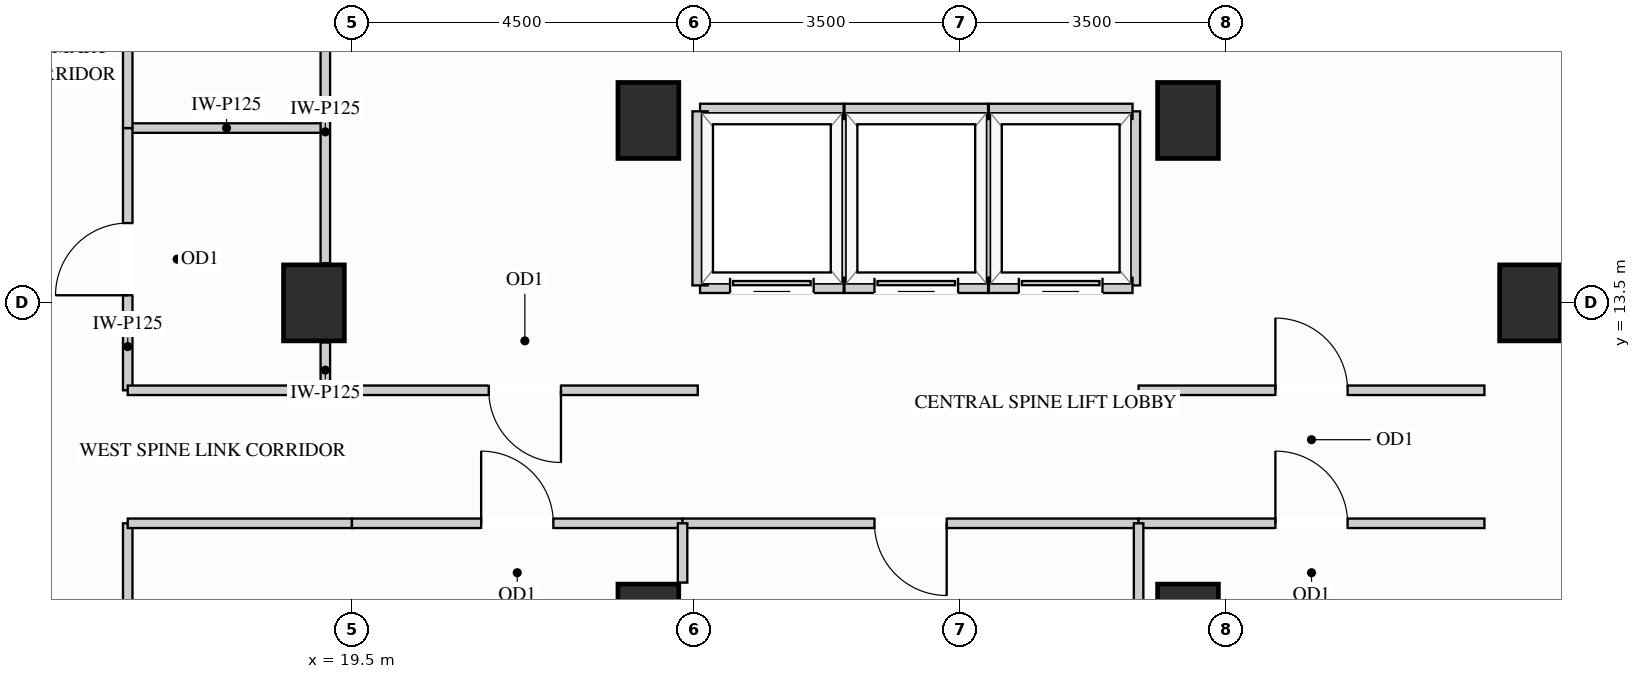
"""IFC4 building model, lengths in metres.
Left out: names, types, materials, properties, quantities, classifications, styles, units other than length and angle.
Written with IfcOpenShell. Run it as: python <this file> out.ifc"""

import sys

from ifc_helpers import new_model, si_unit, direction, frame, frame_2d, origin, origin_2d, place, context, subcontext, project, spatial, rectangle, extrude, source, transform, mapped, element, fill, save


model = new_model("IFC4")
c1 = context("Model", 3, precision=1e-05, world=origin(), true_north=direction((0.0, 1.0)))
c2 = subcontext(c1, "Body", "Model", "MODEL_VIEW")
j1 = project(units=[si_unit("LENGTHUNIT", "METRE"), si_unit("PLANEANGLEUNIT", "RADIAN")], contexts=[c1])
p1 = place(None, origin())
s1 = spatial("IfcSite", under=j1, at=p1, CompositionType="ELEMENT")
p2 = place(p1, origin())
s2 = spatial("IfcBuilding", under=s1, at=p2, CompositionType="ELEMENT")
p3 = place(p2, frame((0.0, 0.0, 186.3)))
s3 = spatial("IfcBuildingStorey", under=s2, at=p3, CompositionType="ELEMENT", Elevation=186.3)
m1 = source(origin(), c2, "Body", "SweptSolid", [
    extrude(rectangle(XDim=0.8, YDim=1.0, at=origin_2d()), origin(), (0.0, 0.0, 1.0), 3.4),
])
for number, where, z_axis, x_axis in (
    (1, (19.0, 13.5, 0.0), (0.0, 0.0, 1.0), (1.0, 0.0, 0.0)),
    (2, (35.0, 13.5, 0.0), (0.0, 0.0, 1.0), (1.0, 0.0, 0.0)),
    (3, (23.4, 15.9, 0.0), (0.0, 0.0, 1.0), (1.0, 0.0, 0.0)),
    (4, (23.4, 9.3, 0.0), (0.0, 0.0, 1.0), (1.0, 0.0, 0.0)),
    (5, (30.5, 15.9, 0.0), (0.0, 0.0, 1.0), (1.0, 0.0, 0.0)),
    (6, (30.5, 9.3, 0.0), (0.0, 0.0, 1.0), (1.0, 0.0, 0.0)),
):
    element("IfcColumn", number, at=place(p3, frame(where, z_axis=z_axis, x_axis=x_axis)), inside=s3, PredefinedType="COLUMN", context=c2, shape_type="MappedRepresentation", body=[
        mapped(m1, transform((0.0, 0.0, 0.0), x_axis=(1.0, 0.0, 0.0), y_axis=(0.0, 1.0, 0.0), z_axis=(0.0, 0.0, 1.0))),
    ])
m2 = source(origin(), c2, "Body", "SweptSolid", [
    extrude(rectangle(XDim=2.6, YDim=0.125, at=frame_2d((1.3, 0.0))), origin(), (0.0, 0.0, 1.0), 3.385),
])
p4 = place(p3, frame((16.55, 15.8, 0.0), z_axis=(0.0, 0.0, 1.0), x_axis=(1.0, 0.0, 0.0)))
e7 = element("IfcWall", 7, at=p4, inside=s3, PredefinedType="PARTITIONING", context=c2, shape_type="MappedRepresentation", body=[
    mapped(m2, transform((0.0, 0.0, 0.0), x_axis=(1.0, 0.0, 0.0), y_axis=(0.0, 1.0, 0.0), z_axis=(0.0, 0.0, 1.0))),
])
m3 = source(origin(), c2, "Body", "SweptSolid", [
    extrude(rectangle(XDim=0.63, YDim=0.125, at=frame_2d((0.315, 0.0))), origin(), (0.0, 0.0, 1.0), 2.773),
])
p5 = place(p3, frame((19.15, 12.35, 0.0), z_axis=(0.0, 0.0, 1.0), x_axis=(0.0, 1.0, 0.0)))
e8 = element("IfcWall", 8, at=p5, inside=s3, PredefinedType="PARTITIONING", context=c2, shape_type="MappedRepresentation", body=[
    mapped(m3, transform((0.0, 0.0, 0.0), x_axis=(1.0, 0.0, 0.0), y_axis=(0.0, 1.0, 0.0), z_axis=(0.0, 0.0, 1.0))),
])
m4 = source(origin(), c2, "Body", "SweptSolid", [
    extrude(rectangle(XDim=3.46, YDim=0.125, at=frame_2d((1.73, 0.0))), origin(), (0.0, 0.0, 1.0), 2.773),
])
p6 = place(p3, frame((19.15, 14.02, 0.0), z_axis=(0.0, 0.0, 1.0), x_axis=(0.0, 1.0, 0.0)))
e9 = element("IfcWall", 9, at=p6, inside=s3, PredefinedType="PARTITIONING", context=c2, shape_type="MappedRepresentation", body=[
    mapped(m4, transform((0.0, 0.0, 0.0), x_axis=(1.0, 0.0, 0.0), y_axis=(0.0, 1.0, 0.0), z_axis=(0.0, 0.0, 1.0))),
])
p7 = place(p3, frame((16.55, 12.35, 0.0), z_axis=(0.0, 0.0, 1.0), x_axis=(0.0, 1.0, 0.0)))
e10 = element("IfcWall", 10, at=p7, inside=s3, PredefinedType="PARTITIONING", context=c2, shape_type="SweptSolid", body=[
    extrude(rectangle(XDim=3.45, YDim=0.125, at=frame_2d((1.725, 0.0))), origin(), (0.0, 0.0, 1.0), 3.385),
])
p8 = place(p7, frame((1.25, 0.0, 0.0)))
e11 = element("IfcOpeningElement", 11, at=p8, cuts=e10, PredefinedType="OPENING", context=c2, shape_type="SweptSolid", body=[
    extrude(rectangle(XDim=0.95, YDim=2.15, at=frame_2d((0.475, 1.075))), frame((0.0, 0.073, 0.0), z_axis=(0.0, -1.0, 0.0), x_axis=(1.0, 0.0, 0.0)), (0.0, 0.0, 1.0), 0.145),
])
p9 = place(p3, frame((16.55, 15.8, 0.0), z_axis=(0.0, 0.0, 1.0), x_axis=(0.0, 1.0, 0.0)))
e12 = element("IfcWall", 12, at=p9, inside=s3, PredefinedType="PARTITIONING", context=c2, shape_type="SweptSolid", body=[
    extrude(rectangle(XDim=7.55, YDim=0.125, at=frame_2d((3.775, 0.0))), origin(), (0.0, 0.0, 1.0), 3.385),
])
p10 = place(p9, frame((3.3, 0.0, 0.0)))
e13 = element("IfcOpeningElement", 13, at=p10, cuts=e12, PredefinedType="OPENING", context=c2, shape_type="SweptSolid", body=[
    extrude(rectangle(XDim=0.95, YDim=2.15, at=frame_2d((0.475, 1.075))), frame((0.0, 0.073, 0.0), z_axis=(0.0, -1.0, 0.0), x_axis=(1.0, 0.0, 0.0)), (0.0, 0.0, 1.0), 0.145),
])
p11 = place(p3, frame((16.55, 5.35, 0.0), z_axis=(0.0, 0.0, 1.0), x_axis=(0.0, 1.0, 0.0)))
e14 = element("IfcWall", 14, at=p11, inside=s3, PredefinedType="PARTITIONING", context=c2, shape_type="SweptSolid", body=[
    extrude(rectangle(XDim=5.25, YDim=0.125, at=frame_2d((2.625, 0.0))), origin(), (0.0, 0.0, 1.0), 3.385),
])
p12 = place(p11, frame((2.15, 0.0, 0.0)))
e15 = element("IfcOpeningElement", 15, at=p12, cuts=e14, PredefinedType="OPENING", context=c2, shape_type="SweptSolid", body=[
    extrude(rectangle(XDim=0.95, YDim=2.15, at=frame_2d((0.475, 1.075))), frame((0.0, 0.073, 0.0), z_axis=(0.0, -1.0, 0.0), x_axis=(1.0, 0.0, 0.0)), (0.0, 0.0, 1.0), 0.145),
])
p13 = place(p3, frame((29.85, 12.35, 0.0), z_axis=(0.0, 0.0, 1.0), x_axis=(1.0, 0.0, 0.0)))
e16 = element("IfcWall", 16, at=p13, inside=s3, PredefinedType="PARTITIONING", context=c2, shape_type="SweptSolid", body=[
    extrude(rectangle(XDim=4.55, YDim=0.125, at=frame_2d((2.275, 0.0))), origin(), (0.0, 0.0, 1.0), 3.385),
])
p14 = place(p13, frame((1.8, 0.0, 0.0)))
e17 = element("IfcOpeningElement", 17, at=p14, cuts=e16, PredefinedType="OPENING", context=c2, shape_type="SweptSolid", body=[
    extrude(rectangle(XDim=0.95, YDim=2.15, at=frame_2d((0.475, 1.075))), frame((0.0, 0.073, 0.0), z_axis=(0.0, -1.0, 0.0), x_axis=(1.0, 0.0, 0.0)), (0.0, 0.0, 1.0), 0.145),
])
m5 = source(origin(), c2, "Body", "SweptSolid", [
    extrude(rectangle(XDim=2.95, YDim=0.125, at=frame_2d((1.475, 0.0))), origin(), (0.0, 0.0, 1.0), 3.385),
])
p15 = place(p3, frame((16.55, 12.35, 0.0), z_axis=(0.0, 0.0, 1.0), x_axis=(1.0, 0.0, 0.0)))
e18 = element("IfcWall", 18, at=p15, inside=s3, PredefinedType="PARTITIONING", context=c2, shape_type="MappedRepresentation", body=[
    mapped(m5, transform((0.0, 0.0, 0.0), x_axis=(1.0, 0.0, 0.0), y_axis=(0.0, 1.0, 0.0), z_axis=(0.0, 0.0, 1.0))),
])
p16 = place(p3, frame((19.5, 12.35, 0.0), z_axis=(0.0, 0.0, 1.0), x_axis=(1.0, 0.0, 0.0)))
e19 = element("IfcWall", 19, at=p16, inside=s3, PredefinedType="PARTITIONING", context=c2, shape_type="SweptSolid", body=[
    extrude(rectangle(XDim=4.55, YDim=0.125, at=frame_2d((2.275, 0.0))), origin(), (0.0, 0.0, 1.0), 3.385),
])
p17 = place(p16, frame((1.8, 0.0, 0.0)))
e20 = element("IfcOpeningElement", 20, at=p17, cuts=e19, PredefinedType="OPENING", context=c2, shape_type="SweptSolid", body=[
    extrude(rectangle(XDim=0.95, YDim=2.15, at=frame_2d((0.475, 1.075))), frame((0.0, 0.073, 0.0), z_axis=(0.0, -1.0, 0.0), x_axis=(1.0, 0.0, 0.0)), (0.0, 0.0, 1.0), 0.145),
])
p18 = place(p3, frame((16.55, 10.6, 0.0), z_axis=(0.0, 0.0, 1.0), x_axis=(1.0, 0.0, 0.0)))
e21 = element("IfcWall", 21, at=p18, inside=s3, PredefinedType="PARTITIONING", context=c2, shape_type="MappedRepresentation", body=[
    mapped(m5, transform((0.0, 0.0, 0.0), x_axis=(1.0, 0.0, 0.0), y_axis=(0.0, 1.0, 0.0), z_axis=(0.0, 0.0, 1.0))),
])
p19 = place(p3, frame((19.5, 10.6, 0.0), z_axis=(0.0, 0.0, 1.0), x_axis=(1.0, 0.0, 0.0)))
e22 = element("IfcWall", 22, at=p19, inside=s3, PredefinedType="PARTITIONING", context=c2, shape_type="SweptSolid", body=[
    extrude(rectangle(XDim=4.35, YDim=0.125, at=frame_2d((2.175, 0.0))), origin(), (0.0, 0.0, 1.0), 3.385),
])
p20 = place(p19, frame((1.7, 0.0, 0.0)))
e23 = element("IfcOpeningElement", 23, at=p20, cuts=e22, PredefinedType="OPENING", context=c2, shape_type="SweptSolid", body=[
    extrude(rectangle(XDim=0.95, YDim=2.15, at=frame_2d((0.475, 1.075))), frame((0.0, 0.073, 0.0), z_axis=(0.0, -1.0, 0.0), x_axis=(1.0, 0.0, 0.0)), (0.0, 0.0, 1.0), 0.145),
])
p21 = place(p3, frame((23.85, 10.6, 0.0), z_axis=(0.0, 0.0, 1.0), x_axis=(1.0, 0.0, 0.0)))
e24 = element("IfcWall", 24, at=p21, inside=s3, PredefinedType="PARTITIONING", context=c2, shape_type="SweptSolid", body=[
    extrude(rectangle(XDim=6.0, YDim=0.125, at=frame_2d((3.0, 0.0))), origin(), (0.0, 0.0, 1.0), 3.385),
])
p22 = place(p21, frame((2.525, 0.0, 0.0)))
e25 = element("IfcOpeningElement", 25, at=p22, cuts=e24, PredefinedType="OPENING", context=c2, shape_type="SweptSolid", body=[
    extrude(rectangle(XDim=0.95, YDim=2.15, at=frame_2d((0.475, 1.075))), frame((0.0, 0.073, 0.0), z_axis=(0.0, -1.0, 0.0), x_axis=(1.0, 0.0, 0.0)), (0.0, 0.0, 1.0), 0.145),
])
p23 = place(p3, frame((29.85, 10.6, 0.0), z_axis=(0.0, 0.0, 1.0), x_axis=(1.0, 0.0, 0.0)))
e26 = element("IfcWall", 26, at=p23, inside=s3, PredefinedType="PARTITIONING", context=c2, shape_type="SweptSolid", body=[
    extrude(rectangle(XDim=4.55, YDim=0.125, at=frame_2d((2.275, 0.0))), origin(), (0.0, 0.0, 1.0), 3.385),
])
p24 = place(p23, frame((1.8, 0.0, 0.0)))
e27 = element("IfcOpeningElement", 27, at=p24, cuts=e26, PredefinedType="OPENING", context=c2, shape_type="SweptSolid", body=[
    extrude(rectangle(XDim=0.95, YDim=2.15, at=frame_2d((0.475, 1.075))), frame((0.0, 0.073, 0.0), z_axis=(0.0, -1.0, 0.0), x_axis=(1.0, 0.0, 0.0)), (0.0, 0.0, 1.0), 0.145),
])
m6 = source(origin(), c2, "Body", "SweptSolid", [
    extrude(rectangle(XDim=0.78, YDim=0.125, at=frame_2d((0.39, 0.0))), origin(), (0.0, 0.0, 1.0), 3.385),
])
p25 = place(p3, frame((23.85, 9.82, 0.0), z_axis=(0.0, 0.0, 1.0), x_axis=(0.0, 1.0, 0.0)))
e28 = element("IfcWall", 28, at=p25, inside=s3, PredefinedType="PARTITIONING", context=c2, shape_type="MappedRepresentation", body=[
    mapped(m6, transform((0.0, 0.0, 0.0), x_axis=(1.0, 0.0, 0.0), y_axis=(0.0, 1.0, 0.0), z_axis=(0.0, 0.0, 1.0))),
])
m7 = source(origin(), c2, "Body", "SweptSolid", [
    extrude(rectangle(XDim=1.748, YDim=0.125, at=frame_2d((0.874, 0.0))), origin(), (0.0, 0.0, 1.0), 3.385),
])
p26 = place(p3, frame((29.85, 8.852, 0.0), z_axis=(0.0, 0.0, 1.0), x_axis=(0.0, 1.0, 0.0)))
e29 = element("IfcWall", 29, at=p26, inside=s3, PredefinedType="PARTITIONING", context=c2, shape_type="MappedRepresentation", body=[
    mapped(m7, transform((0.0, 0.0, 0.0), x_axis=(1.0, 0.0, 0.0), y_axis=(0.0, 1.0, 0.0), z_axis=(0.0, 0.0, 1.0))),
])
m8 = source(origin(), c2, "Body", "SweptSolid", [
    extrude(rectangle(XDim=2.29, YDim=0.2, at=frame_2d((1.145, 0.0))), origin(), (0.0, 0.0, 1.0), 3.385),
])
p27 = place(p3, frame((25.97, 13.73, 0.0), z_axis=(0.0, 0.0, 1.0), x_axis=(0.0, 1.0, 0.0)))
e30 = element("IfcWall", 30, at=p27, inside=s3, PredefinedType="PARTITIONING", context=c2, shape_type="MappedRepresentation", body=[
    mapped(m8, transform((0.0, 0.0, 0.0), x_axis=(1.0, 0.0, 0.0), y_axis=(0.0, 1.0, 0.0), z_axis=(0.0, 0.0, 1.0))),
])
m9 = source(origin(), c2, "Body", "SweptSolid", [
    extrude(rectangle(XDim=1.89, YDim=0.2, at=frame_2d((0.945, 0.0))), origin(), (0.0, 0.0, 1.0), 2.773),
])
p28 = place(p3, frame((24.08, 16.02, 0.0), z_axis=(0.0, 0.0, 1.0), x_axis=(1.0, 0.0, 0.0)))
e31 = element("IfcWall", 31, at=p28, inside=s3, PredefinedType="PARTITIONING", context=c2, shape_type="MappedRepresentation", body=[
    mapped(m9, transform((0.0, 0.0, 0.0), x_axis=(1.0, 0.0, 0.0), y_axis=(0.0, 1.0, 0.0), z_axis=(0.0, 0.0, 1.0))),
])
p29 = place(p3, frame((24.08, 13.73, 0.0), z_axis=(0.0, 0.0, 1.0), x_axis=(1.0, 0.0, 0.0)))
e32 = element("IfcWall", 32, at=p29, inside=s3, PredefinedType="PARTITIONING", context=c2, shape_type="SweptSolid", body=[
    extrude(rectangle(XDim=1.89, YDim=0.2, at=frame_2d((0.945, 0.0))), origin(), (0.0, 0.0, 1.0), 2.466),
])
p30 = place(p29, frame((0.395, 0.0, 0.0)))
e33 = element("IfcOpeningElement", 33, at=p30, cuts=e32, PredefinedType="OPENING", context=c2, shape_type="SweptSolid", body=[
    extrude(rectangle(XDim=1.1, YDim=2.2, at=frame_2d((0.55, 1.1))), frame((0.0, 0.11, 0.0), z_axis=(0.0, -1.0, 0.0), x_axis=(1.0, 0.0, 0.0)), (0.0, 0.0, 1.0), 0.22),
])
for number, where, z_axis, x_axis in (
    (34, (24.08, 13.73, 0.0), (0.0, 0.0, 1.0), (0.0, 1.0, 0.0)),
    (35, (27.87, 13.73, 0.0), (0.0, 0.0, 1.0), (0.0, 1.0, 0.0)),
):
    element("IfcWall", number, at=place(p3, frame(where, z_axis=z_axis, x_axis=x_axis)), inside=s3, PredefinedType="PARTITIONING", context=c2, shape_type="MappedRepresentation", body=[
        mapped(m8, transform((0.0, 0.0, 0.0), x_axis=(1.0, 0.0, 0.0), y_axis=(0.0, 1.0, 0.0), z_axis=(0.0, 0.0, 1.0))),
    ])
m10 = source(origin(), c2, "Body", "SweptSolid", [
    extrude(rectangle(XDim=1.89, YDim=0.2, at=frame_2d((0.945, 0.0))), origin(), (0.0, 0.0, 1.0), 2.773),
])
p31 = place(p3, frame((25.98, 16.02, 0.0), z_axis=(0.0, 0.0, 1.0), x_axis=(1.0, 0.0, 0.0)))
e36 = element("IfcWall", 36, at=p31, inside=s3, PredefinedType="PARTITIONING", context=c2, shape_type="MappedRepresentation", body=[
    mapped(m10, transform((0.0, 0.0, 0.0), x_axis=(1.0, 0.0, 0.0), y_axis=(0.0, 1.0, 0.0), z_axis=(0.0, 0.0, 1.0))),
])
p32 = place(p3, frame((25.98, 13.73, 0.0), z_axis=(0.0, 0.0, 1.0), x_axis=(1.0, 0.0, 0.0)))
e37 = element("IfcWall", 37, at=p32, inside=s3, PredefinedType="PARTITIONING", context=c2, shape_type="SweptSolid", body=[
    extrude(rectangle(XDim=1.89, YDim=0.2, at=frame_2d((0.945, 0.0))), origin(), (0.0, 0.0, 1.0), 2.466),
])
p33 = place(p32, frame((0.395, 0.0, 0.0)))
e38 = element("IfcOpeningElement", 38, at=p33, cuts=e37, PredefinedType="OPENING", context=c2, shape_type="SweptSolid", body=[
    extrude(rectangle(XDim=1.1, YDim=2.2, at=frame_2d((0.55, 1.1))), frame((0.0, 0.11, 0.0), z_axis=(0.0, -1.0, 0.0), x_axis=(1.0, 0.0, 0.0)), (0.0, 0.0, 1.0), 0.22),
])
p34 = place(p3, frame((29.77, 13.73, 0.0), z_axis=(0.0, 0.0, 1.0), x_axis=(0.0, 1.0, 0.0)))
e39 = element("IfcWall", 39, at=p34, inside=s3, PredefinedType="PARTITIONING", context=c2, shape_type="MappedRepresentation", body=[
    mapped(m8, transform((0.0, 0.0, 0.0), x_axis=(1.0, 0.0, 0.0), y_axis=(0.0, 1.0, 0.0), z_axis=(0.0, 0.0, 1.0))),
])
p35 = place(p3, frame((27.88, 16.02, 0.0), z_axis=(0.0, 0.0, 1.0), x_axis=(1.0, 0.0, 0.0)))
e40 = element("IfcWall", 40, at=p35, inside=s3, PredefinedType="PARTITIONING", context=c2, shape_type="MappedRepresentation", body=[
    mapped(m10, transform((0.0, 0.0, 0.0), x_axis=(1.0, 0.0, 0.0), y_axis=(0.0, 1.0, 0.0), z_axis=(0.0, 0.0, 1.0))),
])
p36 = place(p3, frame((27.88, 13.73, 0.0), z_axis=(0.0, 0.0, 1.0), x_axis=(1.0, 0.0, 0.0)))
e41 = element("IfcWall", 41, at=p36, inside=s3, PredefinedType="PARTITIONING", context=c2, shape_type="SweptSolid", body=[
    extrude(rectangle(XDim=1.89, YDim=0.2, at=frame_2d((0.945, 0.0))), origin(), (0.0, 0.0, 1.0), 2.466),
])
p37 = place(p36, frame((0.395, 0.0, 0.0)))
e42 = element("IfcOpeningElement", 42, at=p37, cuts=e41, PredefinedType="OPENING", context=c2, shape_type="SweptSolid", body=[
    extrude(rectangle(XDim=1.1, YDim=2.2, at=frame_2d((0.55, 1.1))), frame((0.0, 0.11, 0.0), z_axis=(0.0, -1.0, 0.0), x_axis=(1.0, 0.0, 0.0)), (0.0, 0.0, 1.0), 0.22),
])
m11 = source(origin(), c2, "Body", "SweptSolid", [
    extrude(rectangle(XDim=1.1, YDim=2.2, at=frame_2d((0.55, 1.1))), frame((0.0, 0.025, 0.0), z_axis=(0.0, -1.0, 0.0), x_axis=(1.0, 0.0, 0.0)), (0.0, 0.0, 1.0), 0.05),
])
p38 = place(p30, origin())
e43 = element("IfcDoor", 43, at=p38, inside=s3, OperationType="SLIDING_TO_LEFT", PredefinedType="DOOR", context=c2, shape_type="MappedRepresentation", body=[
    mapped(m11, transform((0.0, 0.0, 0.0), x_axis=(1.0, 0.0, 0.0), y_axis=(0.0, 1.0, 0.0), z_axis=(0.0, 0.0, 1.0))),
])
fill(e33, e43)
p39 = place(p33, origin())
e44 = element("IfcDoor", 44, at=p39, inside=s3, OperationType="SLIDING_TO_LEFT", PredefinedType="DOOR", context=c2, shape_type="MappedRepresentation", body=[
    mapped(m11, transform((0.0, 0.0, 0.0), x_axis=(1.0, 0.0, 0.0), y_axis=(0.0, 1.0, 0.0), z_axis=(0.0, 0.0, 1.0))),
])
fill(e38, e44)
p40 = place(p37, origin())
e45 = element("IfcDoor", 45, at=p40, inside=s3, OperationType="SLIDING_TO_LEFT", PredefinedType="DOOR", context=c2, shape_type="MappedRepresentation", body=[
    mapped(m11, transform((0.0, 0.0, 0.0), x_axis=(1.0, 0.0, 0.0), y_axis=(0.0, 1.0, 0.0), z_axis=(0.0, 0.0, 1.0))),
])
fill(e42, e45)
m12 = source(origin(), c2, "Body", "SweptSolid", [
    extrude(rectangle(XDim=0.95, YDim=2.15, at=frame_2d((0.475, 1.075))), frame((0.0, 0.025, 0.0), z_axis=(0.0, -1.0, 0.0), x_axis=(1.0, 0.0, 0.0)), (0.0, 0.0, 1.0), 0.05),
])
p41 = place(p8, origin())
e46 = element("IfcDoor", 46, at=p41, inside=s3, OperationType="SINGLE_SWING_LEFT", PredefinedType="DOOR", context=c2, shape_type="MappedRepresentation", body=[
    mapped(m12, transform((0.0, 0.0, 0.0), x_axis=(1.0, 0.0, 0.0), y_axis=(0.0, 1.0, 0.0), z_axis=(0.0, 0.0, 1.0))),
])
fill(e11, e46)
p42 = place(p17, origin())
e47 = element("IfcDoor", 47, at=p42, inside=s3, OperationType="SINGLE_SWING_RIGHT", PredefinedType="DOOR", context=c2, shape_type="MappedRepresentation", body=[
    mapped(m12, transform((0.0, 0.0, 0.0), x_axis=(1.0, 0.0, 0.0), y_axis=(0.0, 1.0, 0.0), z_axis=(0.0, 0.0, 1.0))),
])
fill(e20, e47)
p43 = place(p14, origin())
e48 = element("IfcDoor", 48, at=p43, inside=s3, OperationType="SINGLE_SWING_LEFT", PredefinedType="DOOR", context=c2, shape_type="MappedRepresentation", body=[
    mapped(m12, transform((0.0, 0.0, 0.0), x_axis=(1.0, 0.0, 0.0), y_axis=(0.0, 1.0, 0.0), z_axis=(0.0, 0.0, 1.0))),
])
fill(e17, e48)
p44 = place(p20, origin())
e49 = element("IfcDoor", 49, at=p44, inside=s3, OperationType="SINGLE_SWING_LEFT", PredefinedType="DOOR", context=c2, shape_type="MappedRepresentation", body=[
    mapped(m12, transform((0.0, 0.0, 0.0), x_axis=(1.0, 0.0, 0.0), y_axis=(0.0, 1.0, 0.0), z_axis=(0.0, 0.0, 1.0))),
])
fill(e23, e49)
p45 = place(p22, origin())
e50 = element("IfcDoor", 50, at=p45, inside=s3, OperationType="SINGLE_SWING_RIGHT", PredefinedType="DOOR", context=c2, shape_type="MappedRepresentation", body=[
    mapped(m12, transform((0.0, 0.0, 0.0), x_axis=(1.0, 0.0, 0.0), y_axis=(0.0, 1.0, 0.0), z_axis=(0.0, 0.0, 1.0))),
])
fill(e25, e50)
p46 = place(p24, origin())
e51 = element("IfcDoor", 51, at=p46, inside=s3, OperationType="SINGLE_SWING_LEFT", PredefinedType="DOOR", context=c2, shape_type="MappedRepresentation", body=[
    mapped(m12, transform((0.0, 0.0, 0.0), x_axis=(1.0, 0.0, 0.0), y_axis=(0.0, 1.0, 0.0), z_axis=(0.0, 0.0, 1.0))),
])
fill(e27, e51)
save(model, sys.argv[1])
